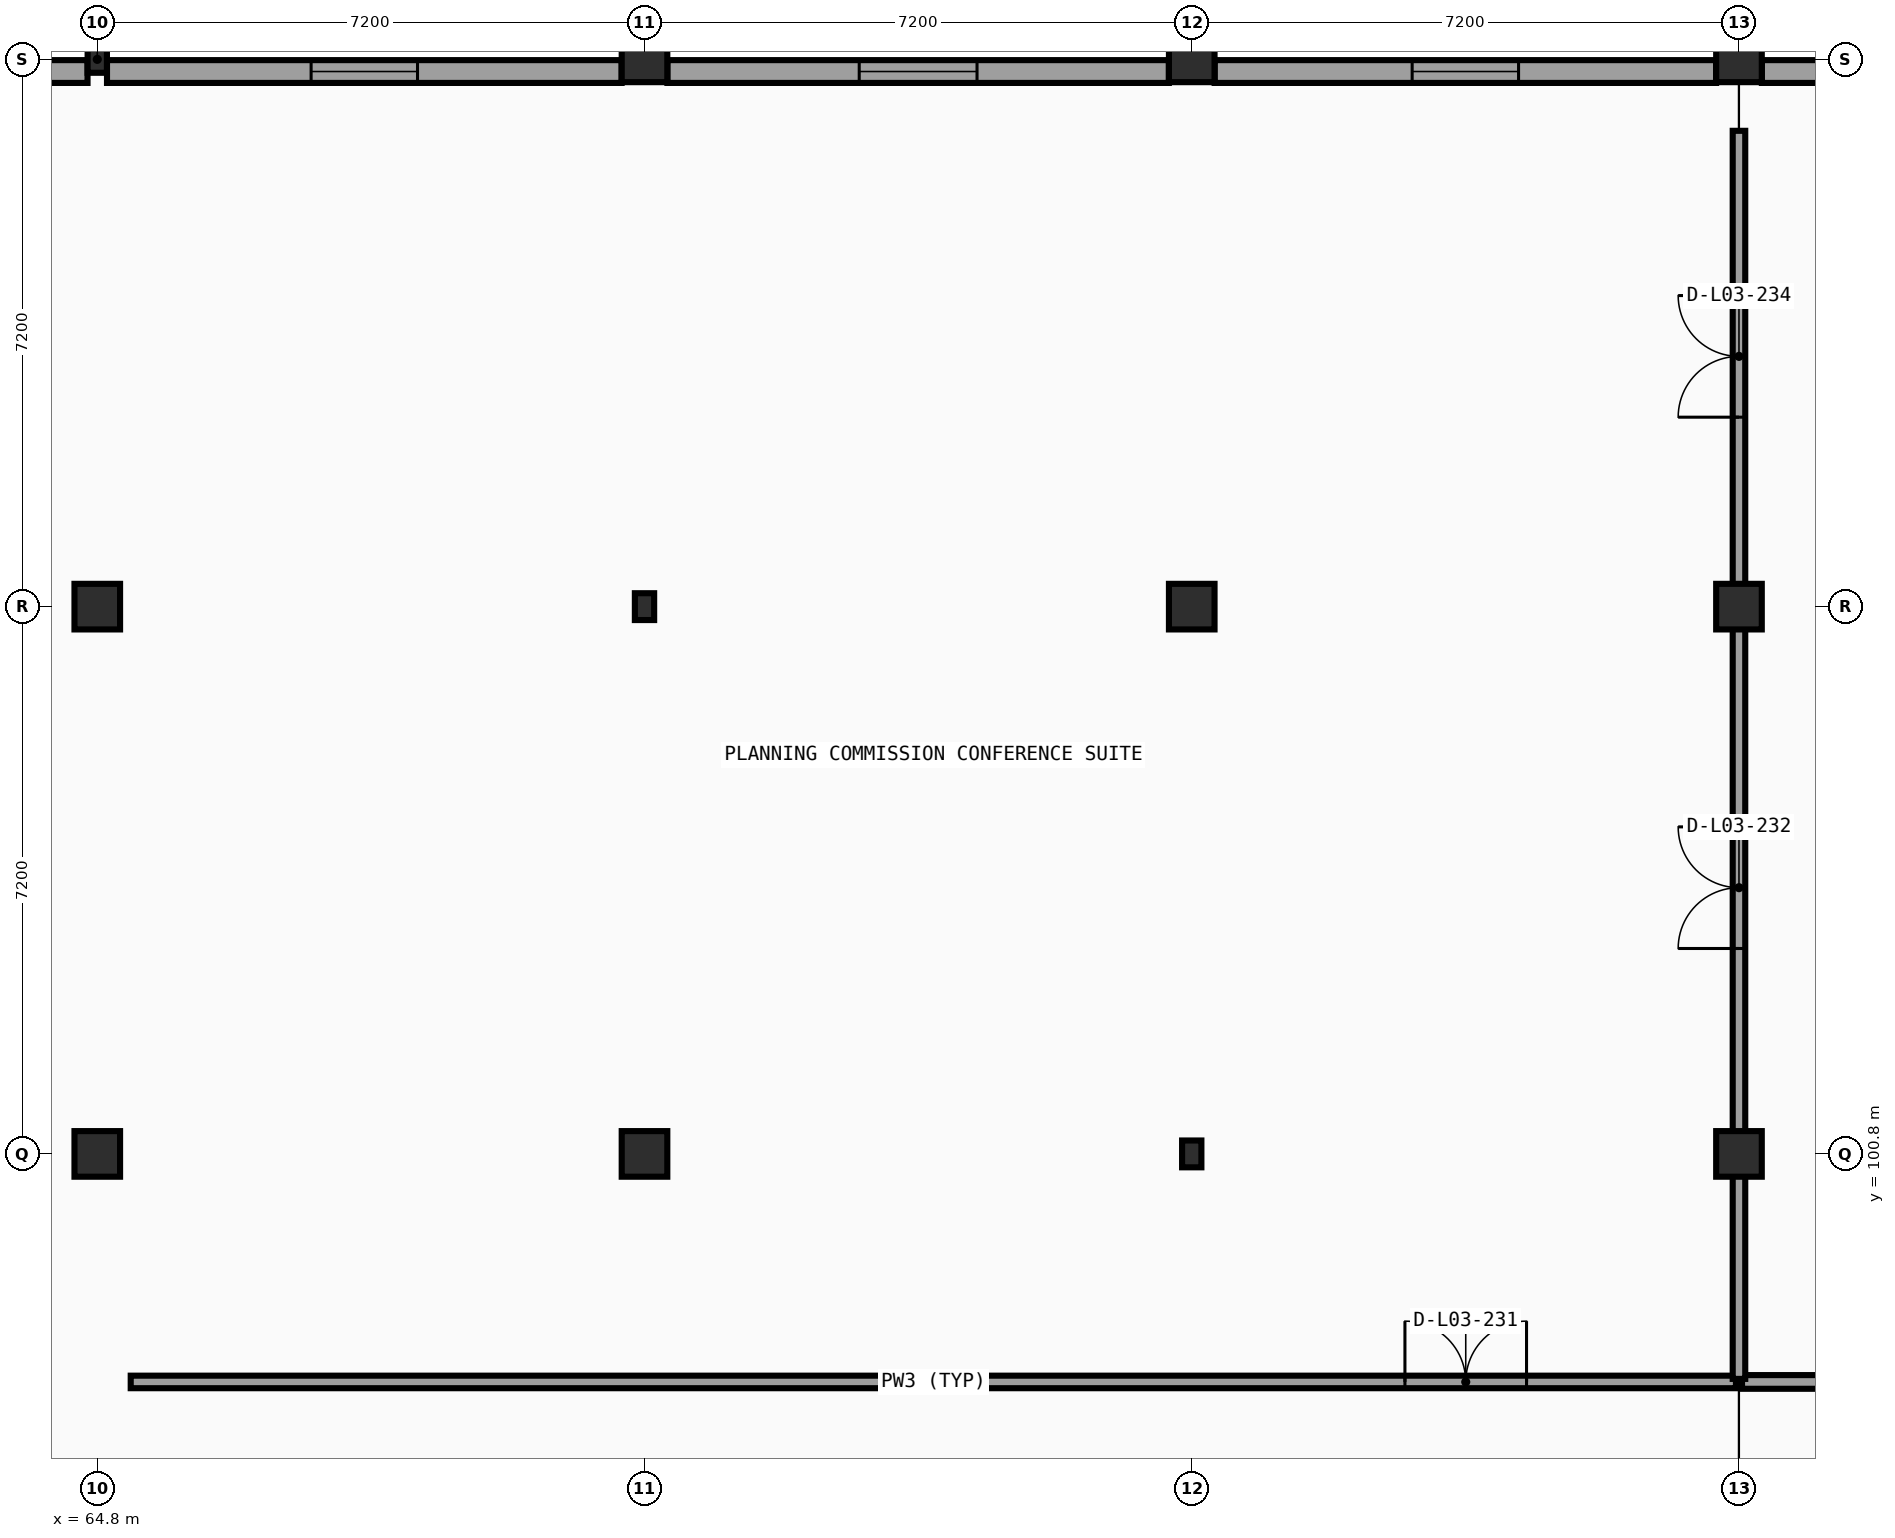
"""IFC4 building model, lengths in metres.
Left out: names, types, materials, properties, quantities, classifications, styles, units other than length and angle.
Written with IfcOpenShell. Run it as: python <this file> out.ifc"""

import sys

from ifc_helpers import new_model, si_unit, direction, frame, frame_2d, origin, origin_2d, place, context, subcontext, project, spatial, rectangle, i_section, extrude, element, fill, save


model = new_model("IFC4")
c1 = context("Model", 3, precision=1e-05, world=origin(), true_north=direction((0.0, 1.0)))
c2 = subcontext(c1, "Body", "Model", "MODEL_VIEW")
j1 = project(units=[si_unit("LENGTHUNIT", "METRE"), si_unit("PLANEANGLEUNIT", "RADIAN")], contexts=[c1])
p1 = place(None, origin())
s1 = spatial("IfcSite", under=j1, at=p1, CompositionType="ELEMENT")
p2 = place(p1, origin())
s2 = spatial("IfcBuilding", under=s1, at=p2, CompositionType="ELEMENT")
p3 = place(p2, frame((0.0, 0.0, 14.7)))
s3 = spatial("IfcBuildingStorey", under=s2, at=p3, CompositionType="ELEMENT", Elevation=14.7)
for number, where, z_axis, x_axis in (
    (1, (64.8, 100.8, 0.0), (0.0, 0.0, 1.0), (1.0, 0.0, 0.0)),
    (2, (64.8, 108.0, 0.0), (0.0, 0.0, 1.0), (1.0, 0.0, 0.0)),
):
    element("IfcColumn", number, at=place(p3, frame(where, z_axis=z_axis, x_axis=x_axis)), inside=s3, PredefinedType="COLUMN", context=c2, shape_type="SweptSolid", body=[
        extrude(rectangle(XDim=0.6, YDim=0.6, at=origin_2d()), origin(), (0.0, 0.0, 1.0), 4.2),
    ])
p4 = place(p3, frame((64.8, 115.2, 0.0), z_axis=(0.0, 0.0, 1.0), x_axis=(1.0, 0.0, 0.0)))
e3 = element("IfcColumn", 3, at=p4, inside=s3, PredefinedType="COLUMN", context=c2, shape_type="SweptSolid", body=[
    extrude(i_section(OverallWidth=0.254, OverallDepth=0.353, WebThickness=0.01, FlangeThickness=0.016, FilletRadius=0.015, at=origin_2d()), origin(), (0.0, 0.0, 1.0), 4.2),
])
p5 = place(p3, frame((72.0, 100.8, 0.0), z_axis=(0.0, 0.0, 1.0), x_axis=(1.0, 0.0, 0.0)))
e4 = element("IfcColumn", 4, at=p5, inside=s3, PredefinedType="COLUMN", context=c2, shape_type="SweptSolid", body=[
    extrude(rectangle(XDim=0.6, YDim=0.6, at=origin_2d()), origin(), (0.0, 0.0, 1.0), 4.2),
])
p6 = place(p3, frame((72.0, 108.0, 0.0), z_axis=(0.0, 0.0, 1.0), x_axis=(1.0, 0.0, 0.0)))
e5 = element("IfcColumn", 5, at=p6, inside=s3, PredefinedType="COLUMN", context=c2, shape_type="SweptSolid", body=[
    extrude(i_section(OverallWidth=0.254, OverallDepth=0.353, WebThickness=0.01, FlangeThickness=0.016, FilletRadius=0.015, at=origin_2d()), origin(), (0.0, 0.0, 1.0), 4.2),
])
p7 = place(p3, frame((72.0, 115.2, 0.0), z_axis=(0.0, 0.0, 1.0), x_axis=(1.0, 0.0, 0.0)))
e6 = element("IfcColumn", 6, at=p7, inside=s3, PredefinedType="COLUMN", context=c2, shape_type="SweptSolid", body=[
    extrude(rectangle(XDim=0.6, YDim=0.6, at=origin_2d()), origin(), (0.0, 0.0, 1.0), 4.2),
])
p8 = place(p3, frame((79.2, 100.8, 0.0), z_axis=(0.0, 0.0, 1.0), x_axis=(1.0, 0.0, 0.0)))
e7 = element("IfcColumn", 7, at=p8, inside=s3, PredefinedType="COLUMN", context=c2, shape_type="SweptSolid", body=[
    extrude(i_section(OverallWidth=0.254, OverallDepth=0.353, WebThickness=0.01, FlangeThickness=0.016, FilletRadius=0.015, at=origin_2d()), origin(), (0.0, 0.0, 1.0), 4.2),
])
for number, where, z_axis, x_axis in (
    (8, (79.2, 108.0, 0.0), (0.0, 0.0, 1.0), (1.0, 0.0, 0.0)),
    (9, (79.2, 115.2, 0.0), (0.0, 0.0, 1.0), (1.0, 0.0, 0.0)),
    (10, (86.4, 100.8, 0.0), (0.0, 0.0, 1.0), (1.0, 0.0, 0.0)),
    (11, (86.4, 108.0, 0.0), (0.0, 0.0, 1.0), (1.0, 0.0, 0.0)),
    (12, (86.4, 115.2, 0.0), (0.0, 0.0, 1.0), (1.0, 0.0, 0.0)),
):
    element("IfcColumn", number, at=place(p3, frame(where, z_axis=z_axis, x_axis=x_axis)), inside=s3, PredefinedType="COLUMN", context=c2, shape_type="SweptSolid", body=[
        extrude(rectangle(XDim=0.6, YDim=0.6, at=origin_2d()), origin(), (0.0, 0.0, 1.0), 4.2),
    ])
p9 = place(p3, frame((57.901, 115.04, 0.0), z_axis=(0.0, 0.0, 1.0), x_axis=(1.0, 0.0, 0.0)))
e13 = element("IfcWall", 13, at=p9, inside=s3, PredefinedType="SOLIDWALL", context=c2, shape_type="SweptSolid", body=[
    extrude(rectangle(XDim=6.771, YDim=0.3, at=frame_2d((3.386, 0.0))), origin(), (0.0, 0.0, 1.0), 3.95),
])
p10 = place(p9, frame((2.611, 0.0, 0.85)))
e14 = element("IfcOpeningElement", 14, at=p10, cuts=e13, PredefinedType="OPENING", context=c2, shape_type="SweptSolid", body=[
    extrude(rectangle(XDim=1.55, YDim=1.65, at=frame_2d((0.775, 0.825))), frame((0.0, 0.16, 0.0), z_axis=(0.0, -1.0, 0.0), x_axis=(1.0, 0.0, 0.0)), (0.0, 0.0, 1.0), 0.32),
])
p11 = place(p3, frame((64.928, 115.04, 0.0), z_axis=(0.0, 0.0, 1.0), x_axis=(1.0, 0.0, 0.0)))
e15 = element("IfcWall", 15, at=p11, inside=s3, PredefinedType="SOLIDWALL", context=c2, shape_type="SweptSolid", body=[
    extrude(rectangle(XDim=6.771, YDim=0.3, at=frame_2d((3.385, 0.0))), origin(), (0.0, 0.0, 1.0), 3.95),
])
p12 = place(p11, frame((2.686, 0.0, 0.85)))
e16 = element("IfcOpeningElement", 16, at=p12, cuts=e15, PredefinedType="OPENING", context=c2, shape_type="SweptSolid", body=[
    extrude(rectangle(XDim=1.4, YDim=1.75, at=frame_2d((0.7, 0.875))), frame((0.0, 0.16, 0.0), z_axis=(0.0, -1.0, 0.0), x_axis=(1.0, 0.0, 0.0)), (0.0, 0.0, 1.0), 0.32),
])
p13 = place(p3, frame((72.301, 115.04, 0.0), z_axis=(0.0, 0.0, 1.0), x_axis=(1.0, 0.0, 0.0)))
e17 = element("IfcWall", 17, at=p13, inside=s3, PredefinedType="SOLIDWALL", context=c2, shape_type="SweptSolid", body=[
    extrude(rectangle(XDim=6.598, YDim=0.3, at=frame_2d((3.299, 0.0))), origin(), (0.0, 0.0, 1.0), 3.95),
])
p14 = place(p13, frame((2.524, 0.0, 0.85)))
e18 = element("IfcOpeningElement", 18, at=p14, cuts=e17, PredefinedType="OPENING", context=c2, shape_type="SweptSolid", body=[
    extrude(rectangle(XDim=1.55, YDim=1.65, at=frame_2d((0.775, 0.825))), frame((0.0, 0.16, 0.0), z_axis=(0.0, -1.0, 0.0), x_axis=(1.0, 0.0, 0.0)), (0.0, 0.0, 1.0), 0.32),
])
p15 = place(p3, frame((79.501, 115.04, 0.0), z_axis=(0.0, 0.0, 1.0), x_axis=(1.0, 0.0, 0.0)))
e19 = element("IfcWall", 19, at=p15, inside=s3, PredefinedType="SOLIDWALL", context=c2, shape_type="SweptSolid", body=[
    extrude(rectangle(XDim=6.598, YDim=0.3, at=frame_2d((3.299, 0.0))), origin(), (0.0, 0.0, 1.0), 3.95),
])
p16 = place(p15, frame((2.599, 0.0, 0.85)))
e20 = element("IfcOpeningElement", 20, at=p16, cuts=e19, PredefinedType="OPENING", context=c2, shape_type="SweptSolid", body=[
    extrude(rectangle(XDim=1.4, YDim=1.75, at=frame_2d((0.7, 0.875))), frame((0.0, 0.16, 0.0), z_axis=(0.0, -1.0, 0.0), x_axis=(1.0, 0.0, 0.0)), (0.0, 0.0, 1.0), 0.32),
])
p17 = place(p3, frame((86.701, 115.04, 0.0), z_axis=(0.0, 0.0, 1.0), x_axis=(1.0, 0.0, 0.0)))
e21 = element("IfcWall", 21, at=p17, inside=s3, PredefinedType="SOLIDWALL", context=c2, shape_type="SweptSolid", body=[
    extrude(rectangle(XDim=6.598, YDim=0.3, at=frame_2d((3.299, 0.0))), origin(), (0.0, 0.0, 1.0), 3.95),
])
p18 = place(p17, frame((2.524, 0.0, 0.85)))
e22 = element("IfcOpeningElement", 22, at=p18, cuts=e21, PredefinedType="OPENING", context=c2, shape_type="SweptSolid", body=[
    extrude(rectangle(XDim=1.55, YDim=1.65, at=frame_2d((0.775, 0.825))), frame((0.0, 0.16, 0.0), z_axis=(0.0, -1.0, 0.0), x_axis=(1.0, 0.0, 0.0)), (0.0, 0.0, 1.0), 0.32),
])
p19 = place(p3, frame((65.24, 97.8, 0.0), z_axis=(0.0, 0.0, 1.0), x_axis=(1.0, 0.0, 0.0)))
e23 = element("IfcWall", 23, at=p19, inside=s3, PredefinedType="PARTITIONING", context=c2, shape_type="SweptSolid", body=[
    extrude(rectangle(XDim=21.12, YDim=0.165, at=frame_2d((10.56, 0.0))), origin(), (0.0, 0.0, 1.0), 3.95),
])
p20 = place(p19, frame((16.765, 0.0, 0.0)))
e24 = element("IfcOpeningElement", 24, at=p20, cuts=e23, PredefinedType="OPENING", context=c2, shape_type="SweptSolid", body=[
    extrude(rectangle(XDim=1.6, YDim=2.1, at=frame_2d((0.8, 1.05))), frame((0.0, 0.093, 0.0), z_axis=(0.0, -1.0, 0.0), x_axis=(1.0, 0.0, 0.0)), (0.0, 0.0, 1.0), 0.185),
])
p21 = place(p3, frame((86.44, 97.8, 0.0), z_axis=(0.0, 0.0, 1.0), x_axis=(1.0, 0.0, 0.0)))
e25 = element("IfcWall", 25, at=p21, inside=s3, PredefinedType="PARTITIONING", context=c2, shape_type="SweptSolid", body=[
    extrude(rectangle(XDim=27.72, YDim=0.18, at=frame_2d((13.86, 0.0))), origin(), (0.0, 0.0, 1.0), 3.95),
])
p22 = place(p21, frame((9.9, 0.0, 0.0)))
e26 = element("IfcOpeningElement", 26, at=p22, cuts=e25, PredefinedType="OPENING", context=c2, shape_type="SweptSolid", body=[
    extrude(rectangle(XDim=1.6, YDim=2.1, at=frame_2d((0.8, 1.05))), frame((0.0, 0.1, 0.0), z_axis=(0.0, -1.0, 0.0), x_axis=(1.0, 0.0, 0.0)), (0.0, 0.0, 1.0), 0.2),
])
p23 = place(p3, frame((86.4, 97.84, 0.0), z_axis=(0.0, 0.0, 1.0), x_axis=(0.0, 1.0, 0.0)))
e27 = element("IfcWall", 27, at=p23, inside=s3, PredefinedType="PARTITIONING", context=c2, shape_type="SweptSolid", body=[
    extrude(rectangle(XDim=16.42, YDim=0.165, at=frame_2d((8.21, 0.0))), origin(), (0.0, 0.0, 1.0), 3.95),
])
p24 = place(p23, frame((5.663, 0.0, 0.0)))
e28 = element("IfcOpeningElement", 28, at=p24, cuts=e27, PredefinedType="OPENING", context=c2, shape_type="SweptSolid", body=[
    extrude(rectangle(XDim=1.6, YDim=2.1, at=frame_2d((0.8, 1.05))), frame((0.0, 0.093, 0.0), z_axis=(0.0, -1.0, 0.0), x_axis=(1.0, 0.0, 0.0)), (0.0, 0.0, 1.0), 0.185),
])
p25 = place(p23, frame((12.653, 0.0, 0.0)))
e29 = element("IfcOpeningElement", 29, at=p25, cuts=e27, PredefinedType="OPENING", context=c2, shape_type="SweptSolid", body=[
    extrude(rectangle(XDim=1.6, YDim=2.1, at=frame_2d((0.8, 1.05))), frame((0.0, 0.093, 0.0), z_axis=(0.0, -1.0, 0.0), x_axis=(1.0, 0.0, 0.0)), (0.0, 0.0, 1.0), 0.185),
])
p26 = place(p12, origin())
e30 = element("IfcWindow", 30, at=p26, inside=s3, PartitioningType="SINGLE_PANEL", PredefinedType="WINDOW", context=c2, shape_type="SweptSolid", body=[
    extrude(rectangle(XDim=1.4, YDim=1.75, at=frame_2d((0.7, 0.875))), frame((0.0, 0.03, 0.0), z_axis=(0.0, -1.0, 0.0), x_axis=(1.0, 0.0, 0.0)), (0.0, 0.0, 1.0), 0.06),
])
fill(e16, e30)
p27 = place(p14, origin())
e31 = element("IfcWindow", 31, at=p27, inside=s3, PartitioningType="SINGLE_PANEL", PredefinedType="WINDOW", context=c2, shape_type="SweptSolid", body=[
    extrude(rectangle(XDim=1.55, YDim=1.65, at=frame_2d((0.775, 0.825))), frame((0.0, 0.03, 0.0), z_axis=(0.0, -1.0, 0.0), x_axis=(1.0, 0.0, 0.0)), (0.0, 0.0, 1.0), 0.06),
])
fill(e18, e31)
p28 = place(p16, origin())
e32 = element("IfcWindow", 32, at=p28, inside=s3, PartitioningType="SINGLE_PANEL", PredefinedType="WINDOW", context=c2, shape_type="SweptSolid", body=[
    extrude(rectangle(XDim=1.4, YDim=1.75, at=frame_2d((0.7, 0.875))), frame((0.0, 0.03, 0.0), z_axis=(0.0, -1.0, 0.0), x_axis=(1.0, 0.0, 0.0)), (0.0, 0.0, 1.0), 0.06),
])
fill(e20, e32)
p29 = place(p20, origin())
e33 = element("IfcDoor", 33, at=p29, inside=s3, OperationType="DOUBLE_DOOR_SINGLE_SWING", PredefinedType="DOOR", context=c2, shape_type="SweptSolid", body=[
    extrude(rectangle(XDim=1.6, YDim=2.1, at=frame_2d((0.8, 1.05))), frame((0.0, 0.025, 0.0), z_axis=(0.0, -1.0, 0.0), x_axis=(1.0, 0.0, 0.0)), (0.0, 0.0, 1.0), 0.05),
])
fill(e24, e33)
p30 = place(p24, origin())
e34 = element("IfcDoor", 34, at=p30, inside=s3, OperationType="DOUBLE_DOOR_SINGLE_SWING", PredefinedType="DOOR", context=c2, shape_type="SweptSolid", body=[
    extrude(rectangle(XDim=1.6, YDim=2.1, at=frame_2d((0.8, 1.05))), frame((0.0, 0.025, 0.0), z_axis=(0.0, -1.0, 0.0), x_axis=(1.0, 0.0, 0.0)), (0.0, 0.0, 1.0), 0.05),
])
fill(e28, e34)
p31 = place(p25, origin())
e35 = element("IfcDoor", 35, at=p31, inside=s3, OperationType="DOUBLE_DOOR_SINGLE_SWING", PredefinedType="DOOR", context=c2, shape_type="SweptSolid", body=[
    extrude(rectangle(XDim=1.6, YDim=2.1, at=frame_2d((0.8, 1.05))), frame((0.0, 0.025, 0.0), z_axis=(0.0, -1.0, 0.0), x_axis=(1.0, 0.0, 0.0)), (0.0, 0.0, 1.0), 0.05),
])
fill(e29, e35)
save(model, sys.argv[1])
